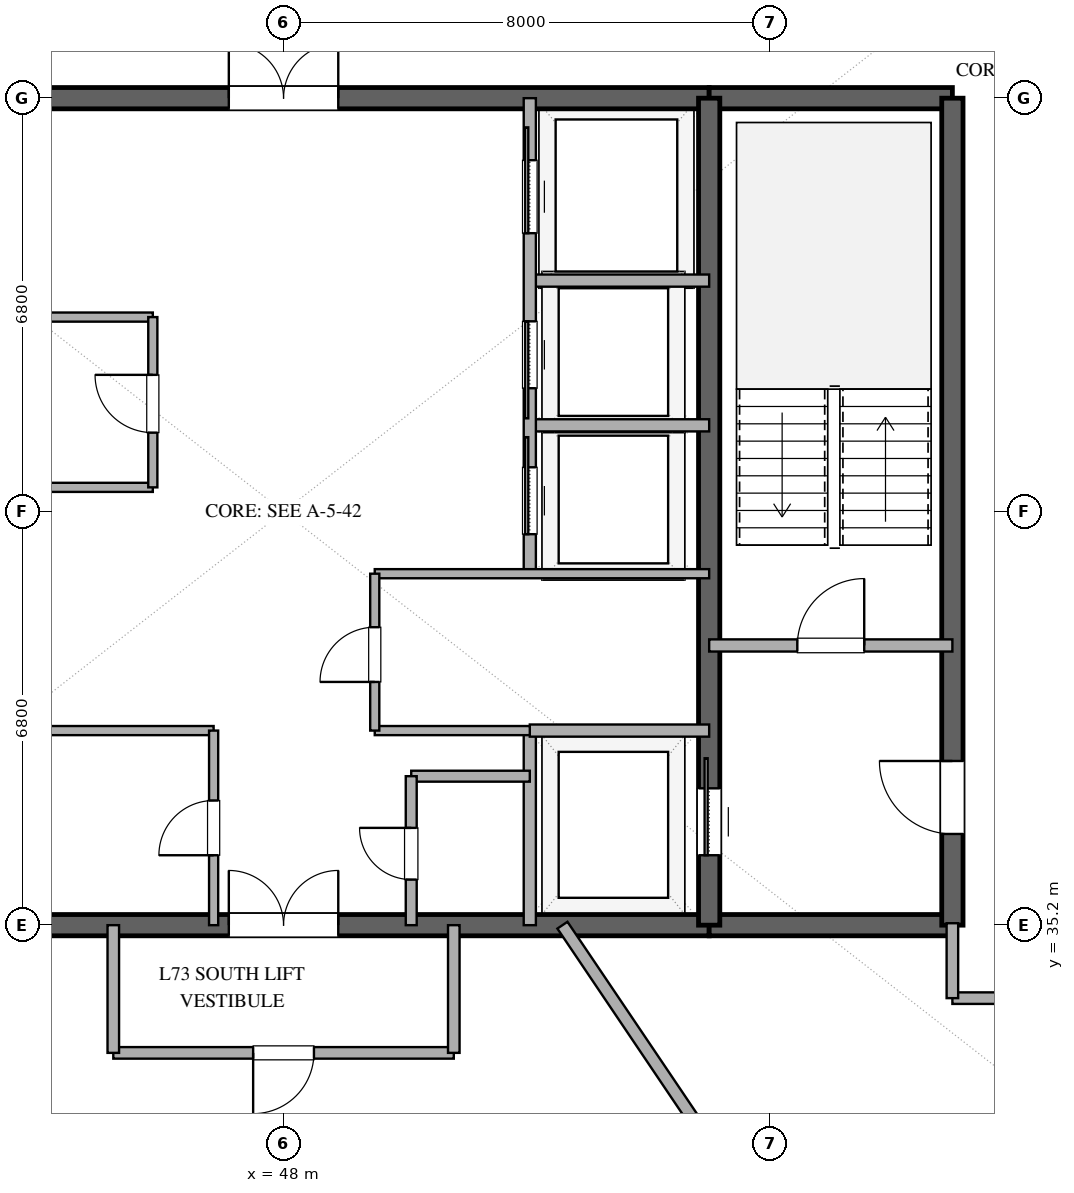
"""IFC4 building model, lengths in metres.
Left out: names, types, materials, properties, quantities, classifications, styles, units other than length and angle.
Written with IfcOpenShell. Run it as: python <this file> out.ifc"""

import sys

from ifc_helpers import new_model, si_unit, direction, frame, frame_2d, origin, place, context, subcontext, project, spatial, rectangle, extrude, element, fill, save


model = new_model("IFC4")
c1 = context("Model", 3, precision=1e-05, world=origin(), true_north=direction((0.0, 1.0)))
c2 = subcontext(c1, "Body", "Model", "MODEL_VIEW")
j1 = project(units=[si_unit("LENGTHUNIT", "METRE"), si_unit("PLANEANGLEUNIT", "RADIAN")], contexts=[c1])
p1 = place(None, origin())
s1 = spatial("IfcSite", under=j1, at=p1, CompositionType="ELEMENT")
p2 = place(p1, origin())
s2 = spatial("IfcBuilding", under=s1, at=p2, CompositionType="ELEMENT")
p3 = place(p2, frame((0.0, 0.0, 283.8)))
s3 = spatial("IfcBuildingStorey", under=s2, at=p3, CompositionType="ELEMENT", Elevation=283.8)
p4 = place(p3, frame((41.0, 35.2, 0.0), z_axis=(0.0, 0.0, 1.0), x_axis=(1.0, 0.0, 0.0)))
e1 = element("IfcWall", 1, at=p4, inside=s3, PredefinedType="SHEAR", context=c2, shape_type="SweptSolid", body=[
    extrude(rectangle(XDim=14.0, YDim=0.35, at=frame_2d((7.0, 0.0))), origin(), (0.0, 0.0, 1.0), 3.37),
])
p5 = place(p4, frame((6.1, 0.0, 0.0)))
e2 = element("IfcOpeningElement", 2, at=p5, cuts=e1, PredefinedType="OPENING", context=c2, shape_type="SweptSolid", body=[
    extrude(rectangle(XDim=1.8, YDim=2.25, at=frame_2d((0.9, 1.125))), frame((0.0, 0.185, 0.0), z_axis=(0.0, -1.0, 0.0), x_axis=(1.0, 0.0, 0.0)), (0.0, 0.0, 1.0), 0.37),
])
p6 = place(p3, frame((55.0, 35.2, 0.0), z_axis=(0.0, 0.0, 1.0), x_axis=(1.0, 0.0, 0.0)))
e3 = element("IfcWall", 3, at=p6, inside=s3, PredefinedType="SHEAR", context=c2, shape_type="SweptSolid", body=[
    extrude(rectangle(XDim=4.0, YDim=0.35, at=frame_2d((2.0, 0.0))), origin(), (0.0, 0.0, 1.0), 3.37),
])
p7 = place(p3, frame((41.0, 48.8, 0.0), z_axis=(0.0, 0.0, 1.0), x_axis=(1.0, 0.0, 0.0)))
e4 = element("IfcWall", 4, at=p7, inside=s3, PredefinedType="SHEAR", context=c2, shape_type="SweptSolid", body=[
    extrude(rectangle(XDim=14.0, YDim=0.35, at=frame_2d((7.0, 0.0))), origin(), (0.0, 0.0, 1.0), 3.37),
])
p8 = place(p7, frame((6.1, 0.0, 0.0)))
e5 = element("IfcOpeningElement", 5, at=p8, cuts=e4, PredefinedType="OPENING", context=c2, shape_type="SweptSolid", body=[
    extrude(rectangle(XDim=1.8, YDim=2.25, at=frame_2d((0.9, 1.125))), frame((0.0, 0.185, 0.0), z_axis=(0.0, -1.0, 0.0), x_axis=(1.0, 0.0, 0.0)), (0.0, 0.0, 1.0), 0.37),
])
p9 = place(p3, frame((55.0, 48.8, 0.0), z_axis=(0.0, 0.0, 1.0), x_axis=(1.0, 0.0, 0.0)))
e6 = element("IfcWall", 6, at=p9, inside=s3, PredefinedType="SHEAR", context=c2, shape_type="SweptSolid", body=[
    extrude(rectangle(XDim=4.0, YDim=0.35, at=frame_2d((2.0, 0.0))), origin(), (0.0, 0.0, 1.0), 3.37),
])
p10 = place(p3, frame((59.0, 35.2, 0.0), z_axis=(0.0, 0.0, 1.0), x_axis=(0.0, 1.0, 0.0)))
e7 = element("IfcWall", 7, at=p10, inside=s3, PredefinedType="SHEAR", context=c2, shape_type="SweptSolid", body=[
    extrude(rectangle(XDim=13.6, YDim=0.35, at=frame_2d((6.8, 0.0))), origin(), (0.0, 0.0, 1.0), 3.37),
])
p11 = place(p10, frame((1.5, 0.0, 0.0)))
e8 = element("IfcOpeningElement", 8, at=p11, cuts=e7, PredefinedType="OPENING", context=c2, shape_type="SweptSolid", body=[
    extrude(rectangle(XDim=1.2, YDim=2.15, at=frame_2d((0.6, 1.075))), frame((0.0, 0.185, 0.0), z_axis=(0.0, -1.0, 0.0), x_axis=(1.0, 0.0, 0.0)), (0.0, 0.0, 1.0), 0.37),
])
p12 = place(p3, frame((55.0, 35.2, 0.0), z_axis=(0.0, 0.0, 1.0), x_axis=(0.0, 1.0, 0.0)))
e9 = element("IfcWall", 9, at=p12, inside=s3, PredefinedType="SHEAR", context=c2, shape_type="SweptSolid", body=[
    extrude(rectangle(XDim=13.6, YDim=0.35, at=frame_2d((6.8, 0.0))), origin(), (0.0, 0.0, 1.0), 3.37),
])
p13 = place(p12, frame((1.15, 0.0, 0.0)))
e10 = element("IfcOpeningElement", 10, at=p13, cuts=e9, PredefinedType="OPENING", context=c2, shape_type="SweptSolid", body=[
    extrude(rectangle(XDim=1.1, YDim=2.2, at=frame_2d((0.55, 1.1))), frame((0.0, 0.185, 0.0), z_axis=(0.0, -1.0, 0.0), x_axis=(1.0, 0.0, 0.0)), (0.0, 0.0, 1.0), 0.37),
])
p14 = place(p3, frame((55.0, 39.8, 0.0), z_axis=(0.0, 0.0, 1.0), x_axis=(1.0, 0.0, 0.0)))
e11 = element("IfcWall", 11, at=p14, inside=s3, PredefinedType="SOLIDWALL", context=c2, shape_type="SweptSolid", body=[
    extrude(rectangle(XDim=4.0, YDim=0.2, at=frame_2d((2.0, 0.0))), origin(), (0.0, 0.0, 1.0), 2.73),
])
p15 = place(p14, frame((1.45, 0.0, 0.0)))
e12 = element("IfcOpeningElement", 12, at=p15, cuts=e11, PredefinedType="OPENING", context=c2, shape_type="SweptSolid", body=[
    extrude(rectangle(XDim=1.1, YDim=2.15, at=frame_2d((0.55, 1.075))), frame((0.0, 0.11, 0.0), z_axis=(0.0, -1.0, 0.0), x_axis=(1.0, 0.0, 0.0)), (0.0, 0.0, 1.0), 0.22),
])
p16 = place(p3, frame((52.05, 35.2, 0.0), z_axis=(0.0, 0.0, 1.0), x_axis=(0.0, 1.0, 0.0)))
e13 = element("IfcWall", 13, at=p16, inside=s3, PredefinedType="SOLIDWALL", context=c2, shape_type="SweptSolid", body=[
    extrude(rectangle(XDim=3.2, YDim=0.2, at=frame_2d((1.6, 0.0))), origin(), (0.0, 0.0, 1.0), 2.73),
])
p17 = place(p3, frame((52.05, 38.4, 0.0), z_axis=(0.0, 0.0, 1.0), x_axis=(1.0, 0.0, 0.0)))
e14 = element("IfcWall", 14, at=p17, inside=s3, PredefinedType="SOLIDWALL", context=c2, shape_type="SweptSolid", body=[
    extrude(rectangle(XDim=2.95, YDim=0.2, at=frame_2d((1.475, 0.0))), origin(), (0.0, 0.0, 1.0), 2.73),
])
for number, where, z_axis, x_axis in (
    (15, (41.0, 42.4, 0.0), (0.0, 0.0, 1.0), (1.0, 0.0, 0.0)),
    (16, (41.0, 45.2, 0.0), (0.0, 0.0, 1.0), (1.0, 0.0, 0.0)),
):
    element("IfcWall", number, at=place(p3, frame(where, z_axis=z_axis, x_axis=x_axis)), inside=s3, PredefinedType="PARTITIONING", context=c2, shape_type="SweptSolid", body=[
        extrude(rectangle(XDim=4.85, YDim=0.15, at=frame_2d((2.425, 0.0))), origin(), (0.0, 0.0, 1.0), 2.73),
    ])
p18 = place(p3, frame((45.85, 42.4, 0.0), z_axis=(0.0, 0.0, 1.0), x_axis=(0.0, 1.0, 0.0)))
e17 = element("IfcWall", 17, at=p18, inside=s3, PredefinedType="PARTITIONING", context=c2, shape_type="SweptSolid", body=[
    extrude(rectangle(XDim=2.8, YDim=0.15, at=frame_2d((1.4, 0.0))), origin(), (0.0, 0.0, 1.0), 2.73),
])
p19 = place(p18, frame((0.9, 0.0, 0.0)))
e18 = element("IfcOpeningElement", 18, at=p19, cuts=e17, PredefinedType="OPENING", context=c2, shape_type="SweptSolid", body=[
    extrude(rectangle(XDim=0.95, YDim=2.15, at=frame_2d((0.475, 1.075))), frame((0.0, 0.085, 0.0), z_axis=(0.0, -1.0, 0.0), x_axis=(1.0, 0.0, 0.0)), (0.0, 0.0, 1.0), 0.17),
])
for number, where, z_axis, x_axis in (
    (19, (52.05, 43.42, 0.0), (0.0, 0.0, 1.0), (1.0, 0.0, 0.0)),
    (20, (52.05, 45.8, 0.0), (0.0, 0.0, 1.0), (1.0, 0.0, 0.0)),
):
    element("IfcWall", number, at=place(p3, frame(where, z_axis=z_axis, x_axis=x_axis)), inside=s3, PredefinedType="SOLIDWALL", context=c2, shape_type="SweptSolid", body=[
        extrude(rectangle(XDim=2.95, YDim=0.2, at=frame_2d((1.475, 0.0))), origin(), (0.0, 0.0, 1.0), 2.73),
    ])
p20 = place(p3, frame((52.05, 40.98, 0.0), z_axis=(0.0, 0.0, 1.0), x_axis=(0.0, 1.0, 0.0)))
e21 = element("IfcWall", 21, at=p20, inside=s3, PredefinedType="SOLIDWALL", context=c2, shape_type="SweptSolid", body=[
    extrude(rectangle(XDim=7.82, YDim=0.2, at=frame_2d((3.91, 0.0))), origin(), (0.0, 0.0, 1.0), 2.73),
])
p21 = place(p20, frame((0.65, 0.0, 0.0)))
e22 = element("IfcOpeningElement", 22, at=p21, cuts=e21, PredefinedType="OPENING", context=c2, shape_type="SweptSolid", body=[
    extrude(rectangle(XDim=1.1, YDim=2.2, at=frame_2d((0.55, 1.1))), frame((0.0, 0.11, 0.0), z_axis=(0.0, -1.0, 0.0), x_axis=(1.0, 0.0, 0.0)), (0.0, 0.0, 1.0), 0.22),
])
p22 = place(p20, frame((3.05, 0.0, 0.0)))
e23 = element("IfcOpeningElement", 23, at=p22, cuts=e21, PredefinedType="OPENING", context=c2, shape_type="SweptSolid", body=[
    extrude(rectangle(XDim=1.1, YDim=2.2, at=frame_2d((0.55, 1.1))), frame((0.0, 0.11, 0.0), z_axis=(0.0, -1.0, 0.0), x_axis=(1.0, 0.0, 0.0)), (0.0, 0.0, 1.0), 0.22),
])
p23 = place(p20, frame((5.6, 0.0, 0.0)))
e24 = element("IfcOpeningElement", 24, at=p23, cuts=e21, PredefinedType="OPENING", context=c2, shape_type="SweptSolid", body=[
    extrude(rectangle(XDim=1.2, YDim=2.2, at=frame_2d((0.6, 1.1))), frame((0.0, 0.11, 0.0), z_axis=(0.0, -1.0, 0.0), x_axis=(1.0, 0.0, 0.0)), (0.0, 0.0, 1.0), 0.22),
])
p24 = place(p3, frame((49.5, 40.98, 0.0), z_axis=(0.0, 0.0, 1.0), x_axis=(1.0, 0.0, 0.0)))
e25 = element("IfcWall", 25, at=p24, inside=s3, PredefinedType="PARTITIONING", context=c2, shape_type="SweptSolid", body=[
    extrude(rectangle(XDim=5.5, YDim=0.15, at=frame_2d((2.75, 0.0))), origin(), (0.0, 0.0, 1.0), 2.73),
])
p25 = place(p3, frame((49.5, 38.4, 0.0), z_axis=(0.0, 0.0, 1.0), x_axis=(1.0, 0.0, 0.0)))
e26 = element("IfcWall", 26, at=p25, inside=s3, PredefinedType="PARTITIONING", context=c2, shape_type="SweptSolid", body=[
    extrude(rectangle(XDim=2.55, YDim=0.15, at=frame_2d((1.275, 0.0))), origin(), (0.0, 0.0, 1.0), 2.73),
])
p26 = place(p3, frame((49.5, 38.4, 0.0), z_axis=(0.0, 0.0, 1.0), x_axis=(0.0, 1.0, 0.0)))
e27 = element("IfcWall", 27, at=p26, inside=s3, PredefinedType="PARTITIONING", context=c2, shape_type="SweptSolid", body=[
    extrude(rectangle(XDim=2.58, YDim=0.15, at=frame_2d((1.29, 0.0))), origin(), (0.0, 0.0, 1.0), 2.73),
])
p27 = place(p26, frame((0.8, 0.0, 0.0)))
e28 = element("IfcOpeningElement", 28, at=p27, cuts=e27, PredefinedType="OPENING", context=c2, shape_type="SweptSolid", body=[
    extrude(rectangle(XDim=0.9, YDim=2.15, at=frame_2d((0.45, 1.075))), frame((0.0, 0.085, 0.0), z_axis=(0.0, -1.0, 0.0), x_axis=(1.0, 0.0, 0.0)), (0.0, 0.0, 1.0), 0.17),
])
p28 = place(p3, frame((43.95, 38.4, 0.0), z_axis=(0.0, 0.0, 1.0), x_axis=(1.0, 0.0, 0.0)))
e29 = element("IfcWall", 29, at=p28, inside=s3, PredefinedType="PARTITIONING", context=c2, shape_type="SweptSolid", body=[
    extrude(rectangle(XDim=2.9, YDim=0.15, at=frame_2d((1.45, 0.0))), origin(), (0.0, 0.0, 1.0), 2.73),
])
p29 = place(p3, frame((46.85, 35.2, 0.0), z_axis=(0.0, 0.0, 1.0), x_axis=(0.0, 1.0, 0.0)))
e30 = element("IfcWall", 30, at=p29, inside=s3, PredefinedType="PARTITIONING", context=c2, shape_type="SweptSolid", body=[
    extrude(rectangle(XDim=3.2, YDim=0.15, at=frame_2d((1.6, 0.0))), origin(), (0.0, 0.0, 1.0), 2.73),
])
p30 = place(p29, frame((1.15, 0.0, 0.0)))
e31 = element("IfcOpeningElement", 31, at=p30, cuts=e30, PredefinedType="OPENING", context=c2, shape_type="SweptSolid", body=[
    extrude(rectangle(XDim=0.9, YDim=2.15, at=frame_2d((0.45, 1.075))), frame((0.0, 0.085, 0.0), z_axis=(0.0, -1.0, 0.0), x_axis=(1.0, 0.0, 0.0)), (0.0, 0.0, 1.0), 0.17),
])
p31 = place(p3, frame((50.1, 37.65, 0.0), z_axis=(0.0, 0.0, 1.0), x_axis=(1.0, 0.0, 0.0)))
e32 = element("IfcWall", 32, at=p31, inside=s3, PredefinedType="PLUMBINGWALL", context=c2, shape_type="SweptSolid", body=[
    extrude(rectangle(XDim=1.95, YDim=0.18, at=frame_2d((0.975, 0.0))), origin(), (0.0, 0.0, 1.0), 2.73),
])
p32 = place(p3, frame((50.1, 35.2, 0.0), z_axis=(0.0, 0.0, 1.0), x_axis=(0.0, 1.0, 0.0)))
e33 = element("IfcWall", 33, at=p32, inside=s3, PredefinedType="PLUMBINGWALL", context=c2, shape_type="SweptSolid", body=[
    extrude(rectangle(XDim=2.45, YDim=0.18, at=frame_2d((1.225, 0.0))), origin(), (0.0, 0.0, 1.0), 2.73),
])
p33 = place(p32, frame((0.75, 0.0, 0.0)))
e34 = element("IfcOpeningElement", 34, at=p33, cuts=e33, PredefinedType="OPENING", context=c2, shape_type="SweptSolid", body=[
    extrude(rectangle(XDim=0.85, YDim=2.1, at=frame_2d((0.425, 1.05))), frame((0.0, 0.1, 0.0), z_axis=(0.0, -1.0, 0.0), x_axis=(1.0, 0.0, 0.0)), (0.0, 0.0, 1.0), 0.2),
])
p34 = place(p3, frame((50.8, 33.1, 0.0), z_axis=(0.0, 0.0, 1.0), x_axis=(-1.0, 0.0, 0.0)))
e35 = element("IfcWall", 35, at=p34, inside=s3, PredefinedType="PARTITIONING", context=c2, shape_type="SweptSolid", body=[
    extrude(rectangle(XDim=5.6, YDim=0.19, at=frame_2d((2.8, 0.0))), origin(), (0.0, 0.0, 1.0), 2.73),
])
p35 = place(p34, frame((2.3, 0.0, 0.0)))
e36 = element("IfcOpeningElement", 36, at=p35, cuts=e35, PredefinedType="OPENING", context=c2, shape_type="SweptSolid", body=[
    extrude(rectangle(XDim=1.0, YDim=2.2, at=frame_2d((0.5, 1.1))), frame((0.0, 0.105, 0.0), z_axis=(0.0, -1.0, 0.0), x_axis=(1.0, 0.0, 0.0)), (0.0, 0.0, 1.0), 0.21),
])
p36 = place(p3, frame((54.97, 31.667, 0.0), z_axis=(0.0, 0.0, 1.0), x_axis=(-0.559200276542, 0.829032599308, 0.0)))
e37 = element("IfcWall", 37, at=p36, inside=s3, PredefinedType="PARTITIONING", context=c2, shape_type="SweptSolid", body=[
    extrude(rectangle(XDim=4.261, YDim=0.2, at=frame_2d((2.131, 0.0))), origin(), (0.0, 0.0, 1.0), 2.73),
])
p37 = place(p3, frame((61.2, 34.0, 0.0), z_axis=(0.0, 0.0, 1.0), x_axis=(-1.0, 0.0, 0.0)))
e38 = element("IfcWall", 38, at=p37, inside=s3, PredefinedType="PARTITIONING", context=c2, shape_type="SweptSolid", body=[
    extrude(rectangle(XDim=2.2, YDim=0.19, at=frame_2d((1.1, 0.0))), origin(), (0.0, 0.0, 1.0), 2.73),
])
for number, where, z_axis, x_axis in (
    (39, (50.8, 35.2, 0.0), (0.0, 0.0, 1.0), (0.0, -1.0, 0.0)),
    (40, (45.2, 33.1, 0.0), (0.0, 0.0, 1.0), (0.0, 1.0, 0.0)),
):
    element("IfcWall", number, at=place(p3, frame(where, z_axis=z_axis, x_axis=x_axis)), inside=s3, PredefinedType="PARTITIONING", context=c2, shape_type="SweptSolid", body=[
        extrude(rectangle(XDim=2.1, YDim=0.19, at=frame_2d((1.05, 0.0))), origin(), (0.0, 0.0, 1.0), 2.73),
    ])
p38 = place(p3, frame((59.0, 34.0, 0.0), z_axis=(0.0, 0.0, 1.0), x_axis=(0.0, 1.0, 0.0)))
e41 = element("IfcWall", 41, at=p38, inside=s3, PredefinedType="PARTITIONING", context=c2, shape_type="SweptSolid", body=[
    extrude(rectangle(XDim=1.232, YDim=0.19, at=frame_2d((0.616, 0.0))), origin(), (0.0, 0.0, 1.0), 2.73),
])
p39 = place(p13, origin())
e42 = element("IfcDoor", 42, at=p39, inside=s3, OperationType="SLIDING_TO_RIGHT", PredefinedType="DOOR", context=c2, shape_type="SweptSolid", body=[
    extrude(rectangle(XDim=1.1, YDim=2.2, at=frame_2d((0.55, 1.1))), frame((0.0, 0.025, 0.0), z_axis=(0.0, -1.0, 0.0), x_axis=(1.0, 0.0, 0.0)), (0.0, 0.0, 1.0), 0.05),
])
fill(e10, e42)
p40 = place(p11, origin())
e43 = element("IfcDoor", 43, at=p40, inside=s3, OperationType="SINGLE_SWING_RIGHT", PredefinedType="DOOR", context=c2, shape_type="SweptSolid", body=[
    extrude(rectangle(XDim=1.2, YDim=2.15, at=frame_2d((0.6, 1.075))), frame((0.0, 0.025, 0.0), z_axis=(0.0, -1.0, 0.0), x_axis=(1.0, 0.0, 0.0)), (0.0, 0.0, 1.0), 0.05),
])
fill(e8, e43)
p41 = place(p5, origin())
e44 = element("IfcDoor", 44, at=p41, inside=s3, OperationType="DOUBLE_DOOR_SINGLE_SWING", PredefinedType="DOOR", context=c2, shape_type="SweptSolid", body=[
    extrude(rectangle(XDim=1.8, YDim=2.25, at=frame_2d((0.9, 1.125))), frame((0.0, 0.025, 0.0), z_axis=(0.0, -1.0, 0.0), x_axis=(1.0, 0.0, 0.0)), (0.0, 0.0, 1.0), 0.05),
])
fill(e2, e44)
p42 = place(p8, origin())
e45 = element("IfcDoor", 45, at=p42, inside=s3, OperationType="DOUBLE_DOOR_SINGLE_SWING", PredefinedType="DOOR", context=c2, shape_type="SweptSolid", body=[
    extrude(rectangle(XDim=1.8, YDim=2.25, at=frame_2d((0.9, 1.125))), frame((0.0, 0.025, 0.0), z_axis=(0.0, -1.0, 0.0), x_axis=(1.0, 0.0, 0.0)), (0.0, 0.0, 1.0), 0.05),
])
fill(e5, e45)
p43 = place(p15, origin())
e46 = element("IfcDoor", 46, at=p43, inside=s3, OperationType="SINGLE_SWING_RIGHT", PredefinedType="DOOR", context=c2, shape_type="SweptSolid", body=[
    extrude(rectangle(XDim=1.1, YDim=2.15, at=frame_2d((0.55, 1.075))), frame((0.0, 0.025, 0.0), z_axis=(0.0, -1.0, 0.0), x_axis=(1.0, 0.0, 0.0)), (0.0, 0.0, 1.0), 0.05),
])
fill(e12, e46)
p44 = place(p19, origin())
e47 = element("IfcDoor", 47, at=p44, inside=s3, OperationType="SINGLE_SWING_RIGHT", PredefinedType="DOOR", context=c2, shape_type="SweptSolid", body=[
    extrude(rectangle(XDim=0.95, YDim=2.15, at=frame_2d((0.475, 1.075))), frame((0.0, 0.025, 0.0), z_axis=(0.0, -1.0, 0.0), x_axis=(1.0, 0.0, 0.0)), (0.0, 0.0, 1.0), 0.05),
])
fill(e18, e47)
p45 = place(p21, origin())
e48 = element("IfcDoor", 48, at=p45, inside=s3, OperationType="SLIDING_TO_RIGHT", PredefinedType="DOOR", context=c2, shape_type="SweptSolid", body=[
    extrude(rectangle(XDim=1.1, YDim=2.2, at=frame_2d((0.55, 1.1))), frame((0.0, 0.025, 0.0), z_axis=(0.0, -1.0, 0.0), x_axis=(1.0, 0.0, 0.0)), (0.0, 0.0, 1.0), 0.05),
])
fill(e22, e48)
p46 = place(p22, origin())
e49 = element("IfcDoor", 49, at=p46, inside=s3, OperationType="SLIDING_TO_LEFT", PredefinedType="DOOR", context=c2, shape_type="SweptSolid", body=[
    extrude(rectangle(XDim=1.1, YDim=2.2, at=frame_2d((0.55, 1.1))), frame((0.0, 0.025, 0.0), z_axis=(0.0, -1.0, 0.0), x_axis=(1.0, 0.0, 0.0)), (0.0, 0.0, 1.0), 0.05),
])
fill(e23, e49)
p47 = place(p23, origin())
e50 = element("IfcDoor", 50, at=p47, inside=s3, OperationType="SLIDING_TO_RIGHT", PredefinedType="DOOR", context=c2, shape_type="SweptSolid", body=[
    extrude(rectangle(XDim=1.2, YDim=2.2, at=frame_2d((0.6, 1.1))), frame((0.0, 0.025, 0.0), z_axis=(0.0, -1.0, 0.0), x_axis=(1.0, 0.0, 0.0)), (0.0, 0.0, 1.0), 0.05),
])
fill(e24, e50)
p48 = place(p27, origin())
e51 = element("IfcDoor", 51, at=p48, inside=s3, OperationType="SINGLE_SWING_LEFT", PredefinedType="DOOR", context=c2, shape_type="SweptSolid", body=[
    extrude(rectangle(XDim=0.9, YDim=2.15, at=frame_2d((0.45, 1.075))), frame((0.0, 0.025, 0.0), z_axis=(0.0, -1.0, 0.0), x_axis=(1.0, 0.0, 0.0)), (0.0, 0.0, 1.0), 0.05),
])
fill(e28, e51)
p49 = place(p30, origin())
e52 = element("IfcDoor", 52, at=p49, inside=s3, OperationType="SINGLE_SWING_LEFT", PredefinedType="DOOR", context=c2, shape_type="SweptSolid", body=[
    extrude(rectangle(XDim=0.9, YDim=2.15, at=frame_2d((0.45, 1.075))), frame((0.0, 0.025, 0.0), z_axis=(0.0, -1.0, 0.0), x_axis=(1.0, 0.0, 0.0)), (0.0, 0.0, 1.0), 0.05),
])
fill(e31, e52)
p50 = place(p33, origin())
e53 = element("IfcDoor", 53, at=p50, inside=s3, OperationType="SINGLE_SWING_RIGHT", PredefinedType="DOOR", context=c2, shape_type="SweptSolid", body=[
    extrude(rectangle(XDim=0.85, YDim=2.1, at=frame_2d((0.425, 1.05))), frame((0.0, 0.025, 0.0), z_axis=(0.0, -1.0, 0.0), x_axis=(1.0, 0.0, 0.0)), (0.0, 0.0, 1.0), 0.05),
])
fill(e34, e53)
p51 = place(p35, origin())
e54 = element("IfcDoor", 54, at=p51, inside=s3, OperationType="SINGLE_SWING_RIGHT", PredefinedType="DOOR", context=c2, shape_type="SweptSolid", body=[
    extrude(rectangle(XDim=1.0, YDim=2.2, at=frame_2d((0.5, 1.1))), frame((0.0, 0.025, 0.0), z_axis=(0.0, -1.0, 0.0), x_axis=(1.0, 0.0, 0.0)), (0.0, 0.0, 1.0), 0.05),
])
fill(e36, e54)
save(model, sys.argv[1])
